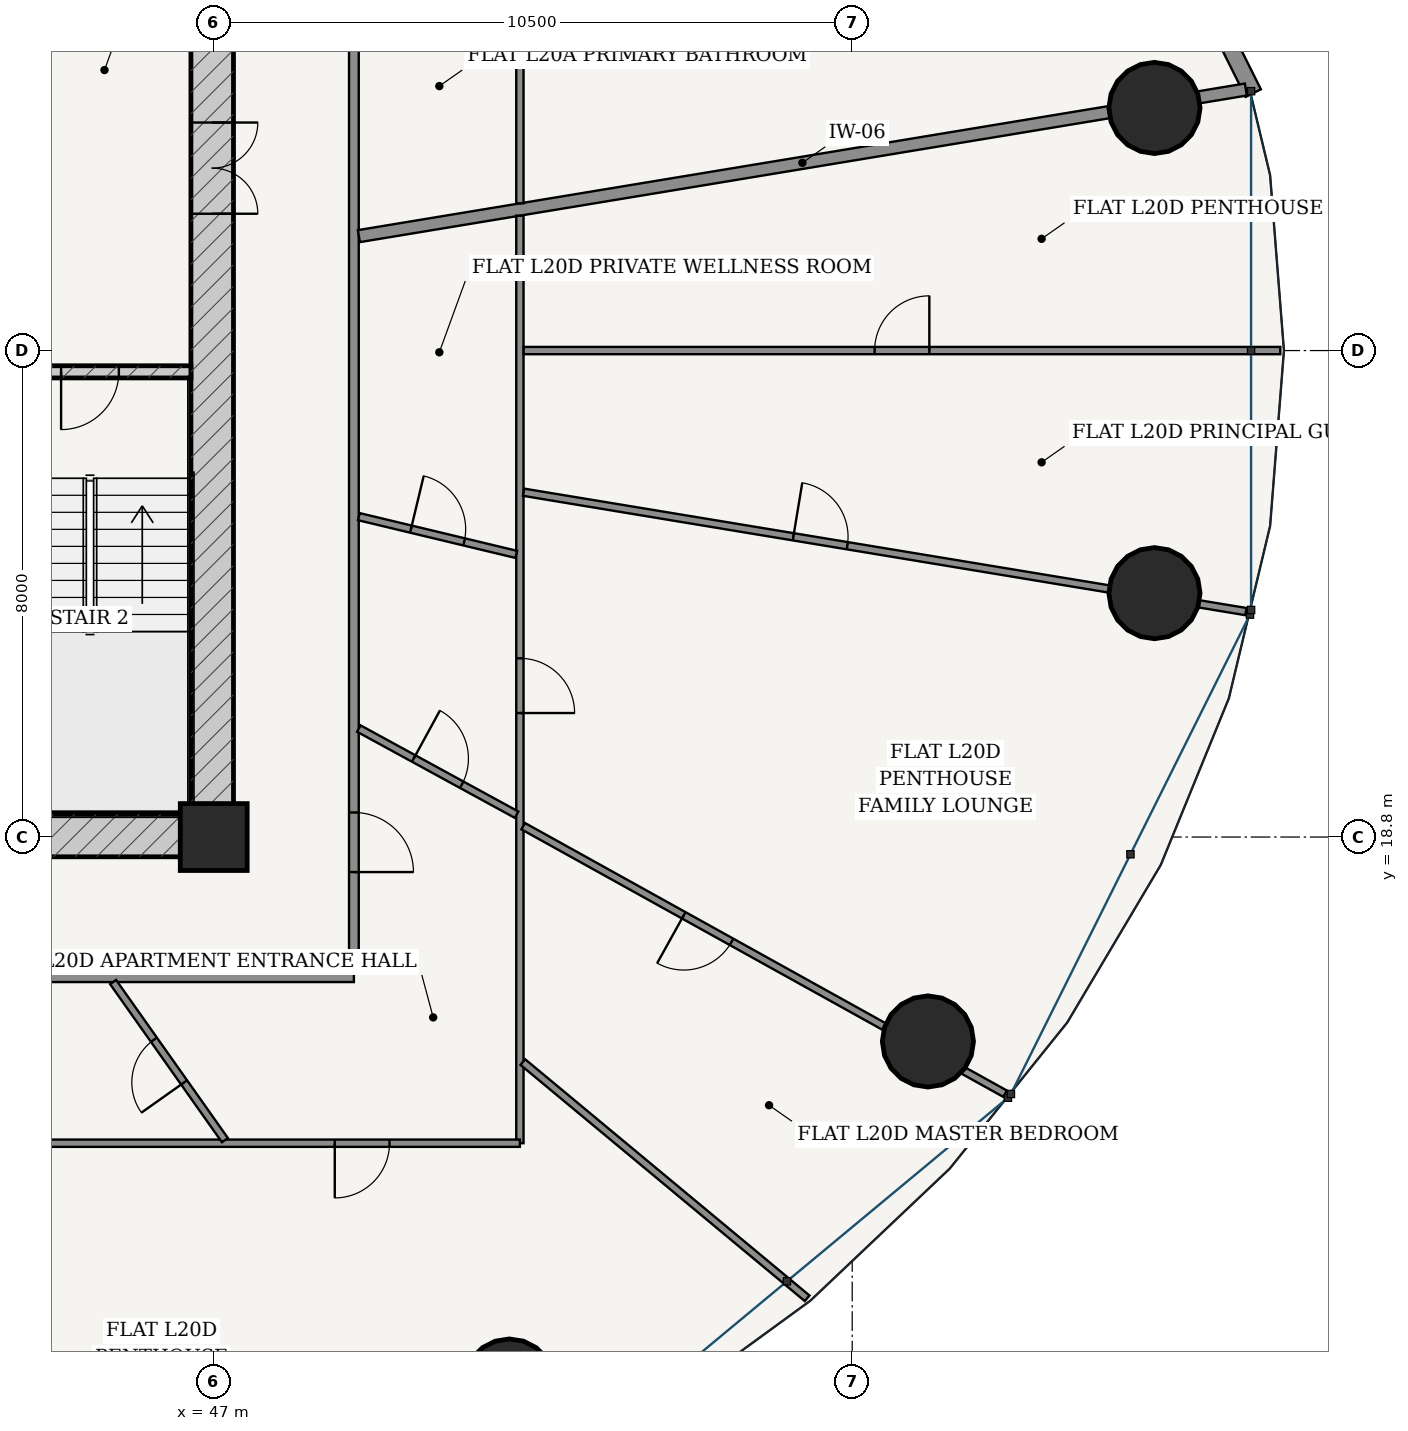
"""IFC4 building model, lengths in metres.
Left out: names, types, materials, properties, quantities, classifications, styles, units other than length and angle.
Written with IfcOpenShell. Run it as: python <this file> out.ifc"""

import sys

from ifc_helpers import new_model, si_unit, direction, frame, frame_2d, origin, origin_2d, place, context, subcontext, project, spatial, rectangle, hollow_circle, extrude, source, transform, mapped, element, fill, save


model = new_model("IFC4")
c1 = context("Model", 3, precision=1e-05, world=origin(), true_north=direction((-0.2419218956, 0.970295726276)))
c2 = subcontext(c1, "Body", "Model", "MODEL_VIEW")
j1 = project(units=[si_unit("LENGTHUNIT", "METRE"), si_unit("PLANEANGLEUNIT", "RADIAN")], contexts=[c1])
p1 = place(None, origin())
s1 = spatial("IfcSite", under=j1, at=p1, CompositionType="ELEMENT")
p2 = place(p1, origin())
s2 = spatial("IfcBuilding", under=s1, at=p2, CompositionType="ELEMENT")
p3 = place(p2, frame((0.0, 0.0, 79.8)))
s3 = spatial("IfcBuildingStorey", under=s2, at=p3, CompositionType="ELEMENT", Elevation=79.8)
p4 = place(p3, frame((47.0, 18.8, 0.0), z_axis=(0.0, 0.0, 1.0), x_axis=(1.0, 0.0, 0.0)))
e1 = element("IfcColumn", 1, at=p4, inside=s3, PredefinedType="COLUMN", context=c2, shape_type="SweptSolid", body=[
    extrude(rectangle(XDim=1.1, YDim=1.1, at=origin_2d()), origin(), (0.0, 0.0, 1.0), 3.6),
])
p5 = place(p3, frame((28.675, 18.825, 0.0), z_axis=(0.0, 0.0, 1.0), x_axis=(1.0, 0.0, 0.0)))
e2 = element("IfcWall", 2, at=p5, inside=s3, PredefinedType="SHEAR", context=c2, shape_type="SweptSolid", body=[
    extrude(rectangle(XDim=18.65, YDim=0.7, at=frame_2d((9.325, 0.0))), origin(), (0.0, 0.0, 1.0), 3.325),
])
p6 = place(p5, frame((7.577, 0.0, 0.0)))
e3 = element("IfcOpeningElement", 3, at=p6, cuts=e2, PredefinedType="OPENING", context=c2, shape_type="SweptSolid", body=[
    extrude(rectangle(XDim=0.85, YDim=2.1, at=frame_2d((0.425, 1.05))), frame((0.0, 0.36, 0.0), z_axis=(0.0, -1.0, 0.0), x_axis=(1.0, 0.0, 0.0)), (0.0, 0.0, 1.0), 0.72),
])
p7 = place(p5, frame((10.623, 0.0, 0.0)))
e4 = element("IfcOpeningElement", 4, at=p7, cuts=e2, PredefinedType="OPENING", context=c2, shape_type="SweptSolid", body=[
    extrude(rectangle(XDim=0.85, YDim=2.1, at=frame_2d((0.425, 1.05))), frame((0.0, 0.36, 0.0), z_axis=(0.0, -1.0, 0.0), x_axis=(1.0, 0.0, 0.0)), (0.0, 0.0, 1.0), 0.72),
])
p8 = place(p3, frame((46.975, 19.175, 0.0), z_axis=(0.0, 0.0, 1.0), x_axis=(0.0, 1.0, 0.0)))
e5 = element("IfcWall", 5, at=p8, inside=s3, PredefinedType="SHEAR", context=c2, shape_type="SweptSolid", body=[
    extrude(rectangle(XDim=15.25, YDim=0.7, at=frame_2d((7.625, 0.0))), origin(), (0.0, 0.0, 1.0), 3.325),
])
p9 = place(p8, frame((9.875, 0.0, 0.0)))
e6 = element("IfcOpeningElement", 6, at=p9, cuts=e5, PredefinedType="OPENING", context=c2, shape_type="SweptSolid", body=[
    extrude(rectangle(XDim=1.5, YDim=2.2, at=frame_2d((0.75, 1.1))), frame((0.0, 0.36, 0.0), z_axis=(0.0, -1.0, 0.0), x_axis=(1.0, 0.0, 0.0)), (0.0, 0.0, 1.0), 0.72),
])
p10 = place(p3, frame((43.305, 26.45, 0.0), z_axis=(0.0, 0.0, 1.0), x_axis=(1.0, 0.0, 0.0)))
e7 = element("IfcWall", 7, at=p10, inside=s3, PredefinedType="SOLIDWALL", context=c2, shape_type="SweptSolid", body=[
    extrude(rectangle(XDim=3.32, YDim=0.2, at=frame_2d((1.66, 0.0))), origin(), (0.0, 0.0, 1.0), 3.325),
])
p11 = place(p10, frame((1.185, 0.0, 0.0)))
e8 = element("IfcOpeningElement", 8, at=p11, cuts=e7, PredefinedType="OPENING", context=c2, shape_type="SweptSolid", body=[
    extrude(rectangle(XDim=0.95, YDim=2.15, at=frame_2d((0.475, 1.075))), frame((0.0, 0.11, 0.0), z_axis=(0.0, -1.0, 0.0), x_axis=(1.0, 0.0, 0.0)), (0.0, 0.0, 1.0), 0.22),
])
for number, where, z_axis, x_axis in (
    (9, (62.471, 30.79, 0.0), (0.0, 0.0, 1.0), (1.0, 0.0, 0.0)),
    (10, (51.862, 9.796, 0.0), (0.0, 0.0, 1.0), (1.0, 0.0, 0.0)),
    (11, (58.745, 15.438, 0.0), (0.0, 0.0, 1.0), (1.0, 0.0, 0.0)),
    (12, (62.471, 22.81, 0.0), (0.0, 0.0, 1.0), (1.0, 0.0, 0.0)),
):
    element("IfcColumn", number, at=place(p3, frame(where, z_axis=z_axis, x_axis=x_axis)), inside=s3, PredefinedType="COLUMN", context=c2, shape_type="SweptSolid", body=[
        extrude(hollow_circle(Radius=0.75, WallThickness=0.045, at=origin_2d()), origin(), (0.0, 0.0, 1.0), 3.6),
    ])
p12 = place(p3, frame((64.095, 31.034, 0.0), z_axis=(0.0, 0.0, 1.0), x_axis=(-0.446263788661, 0.894901464369, 0.0)))
e13 = element("IfcWall", 13, at=p12, inside=s3, PredefinedType="SOLIDWALL", context=c2, shape_type="SweptSolid", body=[
    extrude(rectangle(XDim=9.05, YDim=0.28, at=frame_2d((4.525, 0.0))), origin(), (0.0, 0.0, 1.0), 3.325),
])
p13 = place(p12, frame((1.394, 0.0, 0.85)))
e14 = element("IfcOpeningElement", 14, at=p13, cuts=e13, PredefinedType="OPENING", context=c2, shape_type="SweptSolid", body=[
    extrude(rectangle(XDim=2.1, YDim=1.95, at=frame_2d((1.05, 0.975))), frame((0.0, 0.15, 0.0), z_axis=(0.0, -1.0, 0.0), x_axis=(1.0, 0.0, 0.0)), (0.0, 0.0, 1.0), 0.3),
])
p14 = place(p12, frame((5.557, 0.0, 0.85)))
e15 = element("IfcOpeningElement", 15, at=p14, cuts=e13, PredefinedType="OPENING", context=c2, shape_type="SweptSolid", body=[
    extrude(rectangle(XDim=2.1, YDim=1.95, at=frame_2d((1.05, 0.975))), frame((0.0, 0.15, 0.0), z_axis=(0.0, -1.0, 0.0), x_axis=(1.0, 0.0, 0.0)), (0.0, 0.0, 1.0), 0.3),
])
p15 = place(p3, frame((26.695, 16.495, 0.0), z_axis=(0.0, 0.0, 1.0), x_axis=(1.0, 0.0, 0.0)))
e16 = element("IfcWall", 16, at=p15, inside=s3, PredefinedType="PARTITIONING", context=c2, shape_type="SweptSolid", body=[
    extrude(rectangle(XDim=22.61, YDim=0.16, at=frame_2d((11.305, 0.0))), origin(), (0.0, 0.0, 1.0), 2.767),
])
p16 = place(p3, frame((49.305, 16.575, 0.0), z_axis=(0.0, 0.0, 1.0), x_axis=(0.0, 1.0, 0.0)))
e17 = element("IfcWall", 17, at=p16, inside=s3, PredefinedType="PARTITIONING", context=c2, shape_type="SweptSolid", body=[
    extrude(rectangle(XDim=20.45, YDim=0.16, at=frame_2d((10.225, 0.0))), origin(), (0.0, 0.0, 1.0), 2.767),
])
p17 = place(p16, frame((1.649, 0.0, 0.0)))
e18 = element("IfcOpeningElement", 18, at=p17, cuts=e17, PredefinedType="OPENING", context=c2, shape_type="SweptSolid", body=[
    extrude(rectangle(XDim=0.98, YDim=2.2, at=frame_2d((0.49, 1.1))), frame((0.0, 0.09, 0.0), z_axis=(0.0, -1.0, 0.0), x_axis=(1.0, 0.0, 0.0)), (0.0, 0.0, 1.0), 0.18),
])
p18 = place(p3, frame((49.387, 28.682, 0.0), z_axis=(0.0, 0.0, 1.0), x_axis=(0.986617934215, 0.163049231479, 0.0)))
e19 = element("IfcWall", 19, at=p18, inside=s3, PredefinedType="PARTITIONING", context=c2, shape_type="SweptSolid", body=[
    extrude(rectangle(XDim=14.785, YDim=0.2, at=frame_2d((7.392, 0.0))), origin(), (0.0, 0.0, 1.0), 2.767),
])
p19 = place(p3, frame((52.035, 39.835, 0.0), z_axis=(0.0, 0.0, 1.0), x_axis=(0.0, -1.0, 0.0)))
e20 = element("IfcWall", 20, at=p19, inside=s3, PredefinedType="PARTITIONING", context=c2, shape_type="SweptSolid", body=[
    extrude(rectangle(XDim=10.614, YDim=0.12, at=frame_2d((5.307, 0.0))), origin(), (0.0, 0.0, 1.0), 2.767),
])
p20 = place(p19, frame((2.107, 0.0, 0.0)))
e21 = element("IfcOpeningElement", 21, at=p20, cuts=e20, PredefinedType="OPENING", context=c2, shape_type="SweptSolid", body=[
    extrude(rectangle(XDim=0.9, YDim=2.15, at=frame_2d((0.45, 1.075))), frame((0.0, 0.07, 0.0), z_axis=(0.0, -1.0, 0.0), x_axis=(1.0, 0.0, 0.0)), (0.0, 0.0, 1.0), 0.14),
])
p21 = place(p3, frame((52.035, 29.017, 0.0), z_axis=(0.0, 0.0, 1.0), x_axis=(0.0, -1.0, 0.0)))
e22 = element("IfcWall", 22, at=p21, inside=s3, PredefinedType="PARTITIONING", context=c2, shape_type="SweptSolid", body=[
    extrude(rectangle(XDim=15.252, YDim=0.12, at=frame_2d((7.626, 0.0))), origin(), (0.0, 0.0, 1.0), 2.767),
])
p22 = place(p21, frame((7.278, 0.0, 0.0)))
e23 = element("IfcOpeningElement", 23, at=p22, cuts=e22, PredefinedType="OPENING", context=c2, shape_type="SweptSolid", body=[
    extrude(rectangle(XDim=0.9, YDim=2.15, at=frame_2d((0.45, 1.075))), frame((0.0, 0.07, 0.0), z_axis=(0.0, -1.0, 0.0), x_axis=(1.0, 0.0, 0.0)), (0.0, 0.0, 1.0), 0.14),
])
p23 = place(p3, frame((52.035, 13.765, 0.0), z_axis=(0.0, 0.0, 1.0), x_axis=(-1.0, 0.0, 0.0)))
e24 = element("IfcWall", 24, at=p23, inside=s3, PredefinedType="PARTITIONING", context=c2, shape_type="SweptSolid", body=[
    extrude(rectangle(XDim=10.812, YDim=0.12, at=frame_2d((5.406, 0.0))), origin(), (0.0, 0.0, 1.0), 2.767),
])
p24 = place(p23, frame((2.145, 0.0, 0.0)))
e25 = element("IfcOpeningElement", 25, at=p24, cuts=e24, PredefinedType="OPENING", context=c2, shape_type="SweptSolid", body=[
    extrude(rectangle(XDim=0.9, YDim=2.15, at=frame_2d((0.45, 1.075))), frame((0.0, 0.07, 0.0), z_axis=(0.0, -1.0, 0.0), x_axis=(1.0, 0.0, 0.0)), (0.0, 0.0, 1.0), 0.14),
])
p25 = place(p3, frame((52.083, 15.1, 0.0), z_axis=(0.0, 0.0, 1.0), x_axis=(0.769161827891, -0.63905405289, 0.0)))
e26 = element("IfcWall", 26, at=p25, inside=s3, PredefinedType="PARTITIONING", context=c2, shape_type="SweptSolid", body=[
    extrude(rectangle(XDim=6.08, YDim=0.12, at=frame_2d((3.04, 0.0))), origin(), (0.0, 0.0, 1.0), 2.767),
])
p26 = place(p3, frame((52.089, 18.979, 0.0), z_axis=(0.0, 0.0, 1.0), x_axis=(0.874313476423, -0.485361664066, 0.0)))
e27 = element("IfcWall", 27, at=p26, inside=s3, PredefinedType="PARTITIONING", context=c2, shape_type="SweptSolid", body=[
    extrude(rectangle(XDim=9.066, YDim=0.12, at=frame_2d((4.533, 0.0))), origin(), (0.0, 0.0, 1.0), 2.767),
])
p27 = place(p26, frame((3.02, 0.0, 0.0)))
e28 = element("IfcOpeningElement", 28, at=p27, cuts=e27, PredefinedType="OPENING", context=c2, shape_type="SweptSolid", body=[
    extrude(rectangle(XDim=0.9, YDim=2.15, at=frame_2d((0.45, 1.075))), frame((0.0, 0.07, 0.0), z_axis=(0.0, -1.0, 0.0), x_axis=(1.0, 0.0, 0.0)), (0.0, 0.0, 1.0), 0.14),
])
p28 = place(p3, frame((52.096, 24.47, 0.0), z_axis=(0.0, 0.0, 1.0), x_axis=(0.986618264768, -0.163047231274, 0.0)))
e29 = element("IfcWall", 29, at=p28, inside=s3, PredefinedType="PARTITIONING", context=c2, shape_type="SweptSolid", body=[
    extrude(rectangle(XDim=12.039, YDim=0.12, at=frame_2d((6.02, 0.0))), origin(), (0.0, 0.0, 1.0), 2.767),
])
p29 = place(p28, frame((4.496, 0.0, 0.0)))
e30 = element("IfcOpeningElement", 30, at=p29, cuts=e29, PredefinedType="OPENING", context=c2, shape_type="SweptSolid", body=[
    extrude(rectangle(XDim=0.9, YDim=2.15, at=frame_2d((0.45, 1.075))), frame((0.0, 0.07, 0.0), z_axis=(0.0, -1.0, 0.0), x_axis=(1.0, 0.0, 0.0)), (0.0, 0.0, 1.0), 0.14),
])
p30 = place(p3, frame((52.097, 26.8, 0.0), z_axis=(0.0, 0.0, 1.0), x_axis=(1.0, 0.0, 0.0)))
e31 = element("IfcWall", 31, at=p30, inside=s3, PredefinedType="PARTITIONING", context=c2, shape_type="SweptSolid", body=[
    extrude(rectangle(XDim=12.443, YDim=0.12, at=frame_2d((6.222, 0.0))), origin(), (0.0, 0.0, 1.0), 2.767),
])
p31 = place(p30, frame((5.771, 0.0, 0.0)))
e32 = element("IfcOpeningElement", 32, at=p31, cuts=e31, PredefinedType="OPENING", context=c2, shape_type="SweptSolid", body=[
    extrude(rectangle(XDim=0.9, YDim=2.15, at=frame_2d((0.45, 1.075))), frame((0.0, 0.07, 0.0), z_axis=(0.0, -1.0, 0.0), x_axis=(1.0, 0.0, 0.0)), (0.0, 0.0, 1.0), 0.14),
])
p32 = place(p3, frame((45.345, 16.415, 0.0), z_axis=(0.0, 0.0, 1.0), x_axis=(0.577474693199, -0.816408585645, 0.0)))
e33 = element("IfcWall", 33, at=p32, inside=s3, PredefinedType="PARTITIONING", context=c2, shape_type="SweptSolid", body=[
    extrude(rectangle(XDim=3.184, YDim=0.12, at=frame_2d((1.592, 0.0))), origin(), (0.0, 0.0, 1.0), 3.004),
])
p33 = place(p32, frame((1.162, 0.0, 0.0)))
e34 = element("IfcOpeningElement", 34, at=p33, cuts=e33, PredefinedType="OPENING", context=c2, shape_type="SweptSolid", body=[
    extrude(rectangle(XDim=0.86, YDim=2.15, at=frame_2d((0.43, 1.075))), frame((0.0, 0.07, 0.0), z_axis=(0.0, -1.0, 0.0), x_axis=(1.0, 0.0, 0.0)), (0.0, 0.0, 1.0), 0.14),
])
p34 = place(p3, frame((49.387, 20.583, 0.0), z_axis=(0.0, 0.0, 1.0), x_axis=(0.877718703033, -0.479176249773, 0.0)))
e35 = element("IfcWall", 35, at=p34, inside=s3, PredefinedType="PARTITIONING", context=c2, shape_type="SweptSolid", body=[
    extrude(rectangle(XDim=2.955, YDim=0.12, at=frame_2d((1.478, 0.0))), origin(), (0.0, 0.0, 1.0), 2.767),
])
p35 = place(p34, frame((1.028, 0.0, 0.0)))
e36 = element("IfcOpeningElement", 36, at=p35, cuts=e35, PredefinedType="OPENING", context=c2, shape_type="SweptSolid", body=[
    extrude(rectangle(XDim=0.9, YDim=2.15, at=frame_2d((0.45, 1.075))), frame((0.0, 0.07, 0.0), z_axis=(0.0, -1.0, 0.0), x_axis=(1.0, 0.0, 0.0)), (0.0, 0.0, 1.0), 0.14),
])
p36 = place(p3, frame((49.387, 24.069, 0.0), z_axis=(0.0, 0.0, 1.0), x_axis=(0.972423933179, -0.233220269661, 0.0)))
e37 = element("IfcWall", 37, at=p36, inside=s3, PredefinedType="PARTITIONING", context=c2, shape_type="SweptSolid", body=[
    extrude(rectangle(XDim=2.661, YDim=0.12, at=frame_2d((1.331, 0.0))), origin(), (0.0, 0.0, 1.0), 3.325),
])
p37 = place(p36, frame((0.881, 0.0, 0.0)))
e38 = element("IfcOpeningElement", 38, at=p37, cuts=e37, PredefinedType="OPENING", context=c2, shape_type="SweptSolid", body=[
    extrude(rectangle(XDim=0.9, YDim=2.15, at=frame_2d((0.45, 1.075))), frame((0.0, 0.07, 0.0), z_axis=(0.0, -1.0, 0.0), x_axis=(1.0, 0.0, 0.0)), (0.0, 0.0, 1.0), 0.14),
])
m1 = source(origin(), c2, "Body", "SweptSolid", [
    extrude(rectangle(XDim=1.5, YDim=2.2, at=frame_2d((0.75, 1.1))), frame((0.0, 0.025, 0.0), z_axis=(0.0, -1.0, 0.0), x_axis=(1.0, 0.0, 0.0)), (0.0, 0.0, 1.0), 0.05),
])
p38 = place(p9, frame((1.5, 0.0, 0.0), z_axis=(0.0, 0.0, 1.0), x_axis=(-1.0, 0.0, 0.0)))
e39 = element("IfcDoor", 39, at=p38, inside=s3, OperationType="DOUBLE_DOOR_SINGLE_SWING", PredefinedType="DOOR", context=c2, shape_type="MappedRepresentation", body=[
    mapped(m1, transform((0.0, 0.0, 0.0), scale=1.0)),
])
fill(e6, e39)
m2 = source(origin(), c2, "Body", "SweptSolid", [
    extrude(rectangle(XDim=0.95, YDim=2.15, at=frame_2d((0.475, 1.075))), frame((0.0, 0.025, 0.0), z_axis=(0.0, -1.0, 0.0), x_axis=(1.0, 0.0, 0.0)), (0.0, 0.0, 1.0), 0.05),
])
p39 = place(p11, frame((0.95, 0.0, 0.0), z_axis=(0.0, 0.0, 1.0), x_axis=(-1.0, 0.0, 0.0)))
e40 = element("IfcDoor", 40, at=p39, inside=s3, OperationType="SINGLE_SWING_RIGHT", PredefinedType="DOOR", context=c2, shape_type="MappedRepresentation", body=[
    mapped(m2, transform((0.0, 0.0, 0.0), scale=1.0)),
])
fill(e8, e40)
m3 = source(origin(), c2, "Body", "SweptSolid", [
    extrude(rectangle(XDim=0.98, YDim=2.2, at=frame_2d((0.49, 1.1))), frame((0.0, 0.025, 0.0), z_axis=(0.0, -1.0, 0.0), x_axis=(1.0, 0.0, 0.0)), (0.0, 0.0, 1.0), 0.05),
])
p40 = place(p17, frame((0.98, 0.0, 0.0), z_axis=(0.0, 0.0, 1.0), x_axis=(-1.0, 0.0, 0.0)))
e41 = element("IfcDoor", 41, at=p40, inside=s3, OperationType="SINGLE_SWING_RIGHT", PredefinedType="DOOR", context=c2, shape_type="MappedRepresentation", body=[
    mapped(m3, transform((0.0, 0.0, 0.0), scale=1.0)),
])
fill(e18, e41)
m4 = source(origin(), c2, "Body", "SweptSolid", [
    extrude(rectangle(XDim=0.86, YDim=2.15, at=frame_2d((0.43, 1.075))), frame((0.0, 0.025, 0.0), z_axis=(0.0, -1.0, 0.0), x_axis=(1.0, 0.0, 0.0)), (0.0, 0.0, 1.0), 0.05),
])
p41 = place(p33, frame((0.86, 0.0, 0.0), z_axis=(0.0, 0.0, 1.0), x_axis=(-1.0, 0.0, 0.0)))
e42 = element("IfcDoor", 42, at=p41, inside=s3, OperationType="SINGLE_SWING_LEFT", PredefinedType="DOOR", context=c2, shape_type="MappedRepresentation", body=[
    mapped(m4, transform((0.0, 0.0, 0.0), scale=1.0)),
])
fill(e34, e42)
m5 = source(origin(), c2, "Body", "SweptSolid", [
    extrude(rectangle(XDim=0.9, YDim=2.15, at=frame_2d((0.45, 1.075))), frame((0.0, 0.025, 0.0), z_axis=(0.0, -1.0, 0.0), x_axis=(1.0, 0.0, 0.0)), (0.0, 0.0, 1.0), 0.05),
])
p42 = place(p24, origin())
e43 = element("IfcDoor", 43, at=p42, inside=s3, OperationType="SINGLE_SWING_RIGHT", PredefinedType="DOOR", context=c2, shape_type="MappedRepresentation", body=[
    mapped(m5, transform((0.0, 0.0, 0.0), scale=1.0)),
])
fill(e25, e43)
p43 = place(p35, origin())
e44 = element("IfcDoor", 44, at=p43, inside=s3, OperationType="SINGLE_SWING_LEFT", PredefinedType="DOOR", context=c2, shape_type="MappedRepresentation", body=[
    mapped(m5, transform((0.0, 0.0, 0.0), scale=1.0)),
])
fill(e36, e44)
p44 = place(p22, origin())
e45 = element("IfcDoor", 45, at=p44, inside=s3, OperationType="SINGLE_SWING_RIGHT", PredefinedType="DOOR", context=c2, shape_type="MappedRepresentation", body=[
    mapped(m5, transform((0.0, 0.0, 0.0), scale=1.0)),
])
fill(e23, e45)
p45 = place(p37, origin())
e46 = element("IfcDoor", 46, at=p45, inside=s3, OperationType="SINGLE_SWING_LEFT", PredefinedType="DOOR", context=c2, shape_type="MappedRepresentation", body=[
    mapped(m5, transform((0.0, 0.0, 0.0), scale=1.0)),
])
fill(e38, e46)
p46 = place(p27, frame((0.9, 0.0, 0.0), z_axis=(0.0, 0.0, 1.0), x_axis=(-1.0, 0.0, 0.0)))
e47 = element("IfcDoor", 47, at=p46, inside=s3, OperationType="SINGLE_SWING_RIGHT", PredefinedType="DOOR", context=c2, shape_type="MappedRepresentation", body=[
    mapped(m5, transform((0.0, 0.0, 0.0), scale=1.0)),
])
fill(e28, e47)
p47 = place(p29, origin())
e48 = element("IfcDoor", 48, at=p47, inside=s3, OperationType="SINGLE_SWING_LEFT", PredefinedType="DOOR", context=c2, shape_type="MappedRepresentation", body=[
    mapped(m5, transform((0.0, 0.0, 0.0), scale=1.0)),
])
fill(e30, e48)
p48 = place(p31, origin())
e49 = element("IfcDoor", 49, at=p48, inside=s3, OperationType="SINGLE_SWING_RIGHT", PredefinedType="DOOR", context=c2, shape_type="MappedRepresentation", body=[
    mapped(m5, transform((0.0, 0.0, 0.0), scale=1.0)),
])
fill(e32, e49)
save(model, sys.argv[1])
